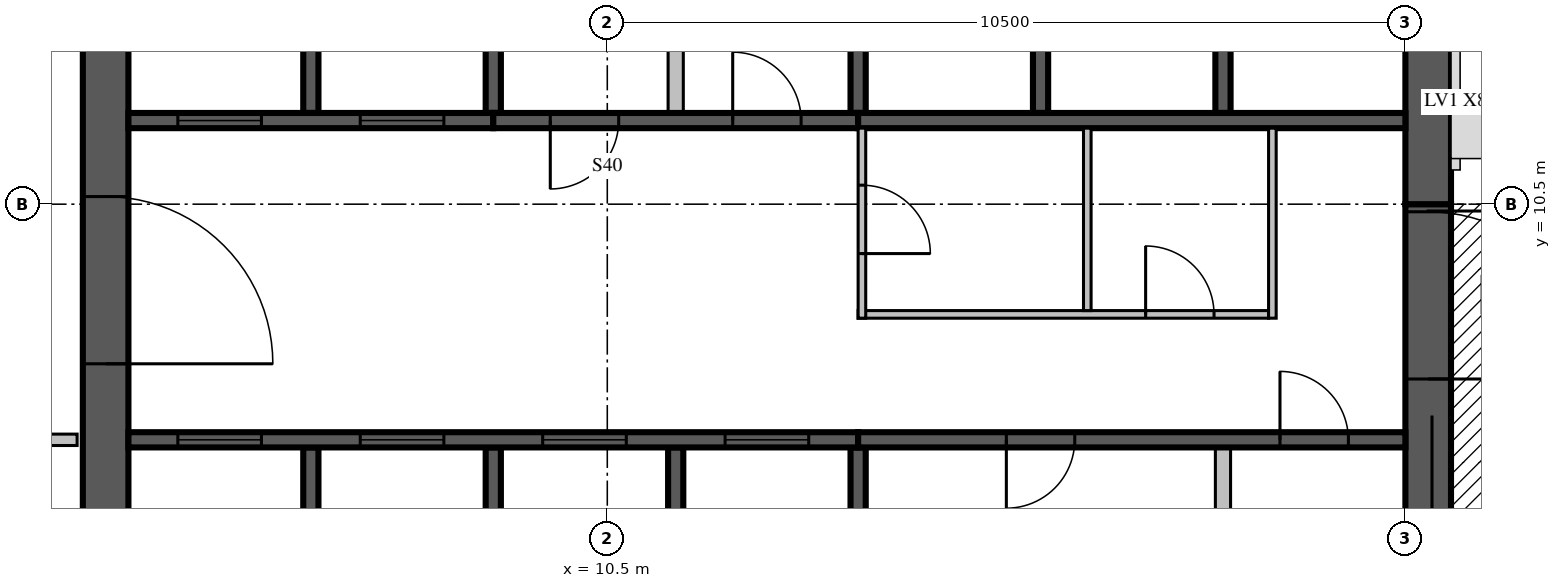
"""IFC4 building model, lengths in metres.
Left out: names, types, materials, properties, quantities, classifications, styles, units other than length and angle.
Written with IfcOpenShell. Run it as: python <this file> out.ifc"""

import sys

from ifc_helpers import new_model, si_unit, direction, frame, frame_2d, origin, place, context, subcontext, project, spatial, rectangle, extrude, source, transform, mapped, element, fill, save


model = new_model("IFC4")
c1 = context("Model", 3, precision=1e-05, world=origin(), true_north=direction((0.0, 1.0)))
c2 = subcontext(c1, "Body", "Model", "MODEL_VIEW")
j1 = project(units=[si_unit("LENGTHUNIT", "METRE"), si_unit("PLANEANGLEUNIT", "RADIAN")], contexts=[c1])
p1 = place(None, origin())
s1 = spatial("IfcSite", under=j1, at=p1, CompositionType="ELEMENT")
p2 = place(p1, origin())
s2 = spatial("IfcBuilding", under=s1, at=p2, CompositionType="ELEMENT")
p3 = place(p2, frame((0.0, 0.0, 291.5)))
s3 = spatial("IfcBuildingStorey", under=s2, at=p3, CompositionType="ELEMENT", Elevation=291.5)
m1 = source(origin(), c2, "Body", "SweptSolid", [
    extrude(rectangle(XDim=17.4, YDim=0.6, at=frame_2d((8.7, 0.0))), origin(), (0.0, 0.0, 1.0), 3.5),
])
p4 = place(p3, frame((3.9, 4.2, 0.0), z_axis=(0.0, 0.0, 1.0), x_axis=(0.0, 1.0, 0.0)))
e1 = element("IfcWall", 1, at=p4, inside=s3, PredefinedType="SHEAR", context=c2, shape_type="MappedRepresentation", body=[
    mapped(m1, transform((0.0, 0.0, 0.0), scale=1.0)),
])
m2 = source(origin(), c2, "Body", "SweptSolid", [
    extrude(rectangle(XDim=2.2, YDim=2.1, at=frame_2d((1.1, 1.05))), frame((0.0, 0.31, 0.0), z_axis=(0.0, -1.0, 0.0), x_axis=(1.0, 0.0, 0.0)), (0.0, 0.0, 1.0), 0.62),
])
p5 = place(p4, frame((4.2, 0.0, 0.0)))
e2 = element("IfcOpeningElement", 2, at=p5, cuts=e1, PredefinedType="OPENING", context=c2, shape_type="MappedRepresentation", body=[
    mapped(m2, transform((0.0, 0.0, 0.0), scale=1.0)),
])
m3 = source(origin(), c2, "Body", "SweptSolid", [
    extrude(rectangle(XDim=0.9, YDim=2.1, at=frame_2d((0.45, 1.05))), frame((0.0, 0.31, 0.0), z_axis=(0.0, -1.0, 0.0), x_axis=(1.0, 0.0, 0.0)), (0.0, 0.0, 1.0), 0.62),
])
p6 = place(p4, frame((10.95, 0.0, 0.0)))
e3 = element("IfcOpeningElement", 3, at=p6, cuts=e1, PredefinedType="OPENING", context=c2, shape_type="MappedRepresentation", body=[
    mapped(m3, transform((0.0, 0.0, 0.0), scale=1.0)),
])
m4 = source(origin(), c2, "Body", "SweptSolid", [
    extrude(rectangle(XDim=6.3, YDim=0.6, at=frame_2d((3.15, 0.0))), origin(), (0.0, 0.0, 1.0), 3.5),
])
p7 = place(p3, frame((21.3, 4.2, 0.0), z_axis=(0.0, 0.0, 1.0), x_axis=(0.0, 1.0, 0.0)))
e4 = element("IfcWall", 4, at=p7, inside=s3, PredefinedType="SHEAR", context=c2, shape_type="MappedRepresentation", body=[
    mapped(m4, transform((0.0, 0.0, 0.0), scale=1.0)),
])
p8 = place(p7, frame((4.0, 0.0, 0.0)))
e5 = element("IfcOpeningElement", 5, at=p8, cuts=e4, PredefinedType="OPENING", context=c2, shape_type="MappedRepresentation", body=[
    mapped(m2, transform((0.0, 0.0, 0.0), scale=1.0)),
])
m5 = source(origin(), c2, "Body", "SweptSolid", [
    extrude(rectangle(XDim=10.5, YDim=0.6, at=frame_2d((5.25, 0.0))), origin(), (0.0, 0.0, 1.0), 3.5),
])
p9 = place(p3, frame((21.3, 10.5, 0.0), z_axis=(0.0, 0.0, 1.0), x_axis=(0.0, 1.0, 0.0)))
e6 = element("IfcWall", 6, at=p9, inside=s3, PredefinedType="SHEAR", context=c2, shape_type="MappedRepresentation", body=[
    mapped(m5, transform((0.0, 0.0, 0.0), scale=1.0)),
])
m6 = source(origin(), c2, "Body", "SweptSolid", [
    extrude(rectangle(XDim=1.2, YDim=2.4, at=frame_2d((0.6, 1.2))), frame((0.0, 0.31, 0.0), z_axis=(0.0, -1.0, 0.0), x_axis=(1.0, 0.0, 0.0)), (0.0, 0.0, 1.0), 0.62),
])
p10 = place(p9, frame((5.7, 0.0, 0.6)))
e7 = element("IfcOpeningElement", 7, at=p10, cuts=e6, PredefinedType="OPENING", context=c2, shape_type="MappedRepresentation", body=[
    mapped(m6, transform((0.0, 0.0, 0.0), scale=1.0)),
])
m7 = source(origin(), c2, "Body", "SweptSolid", [
    extrude(rectangle(XDim=3.1, YDim=0.2, at=frame_2d((1.55, 0.0))), origin(), (0.0, 0.0, 1.0), 3.5),
])
for number, where, z_axis, x_axis in (
    (8, (6.6, 4.2, 0.0), (0.0, 0.0, 1.0), (0.0, 1.0, 0.0)),
    (9, (9.0, 4.2, 0.0), (0.0, 0.0, 1.0), (0.0, 1.0, 0.0)),
    (10, (11.4, 4.2, 0.0), (0.0, 0.0, 1.0), (0.0, 1.0, 0.0)),
):
    element("IfcWall", number, at=place(p3, frame(where, z_axis=z_axis, x_axis=x_axis)), inside=s3, PredefinedType="SOLIDWALL", context=c2, shape_type="MappedRepresentation", body=[
        mapped(m7, transform((0.0, 0.0, 0.0), scale=1.0)),
    ])
m8 = source(origin(), c2, "Body", "SweptSolid", [
    extrude(rectangle(XDim=3.1, YDim=0.2, at=frame_2d((1.55, 0.0))), origin(), (0.0, 0.0, 1.0), 3.1),
])
p11 = place(p3, frame((13.8, 4.2, 0.0), z_axis=(0.0, 0.0, 1.0), x_axis=(0.0, 1.0, 0.0)))
e11 = element("IfcWall", 11, at=p11, inside=s3, PredefinedType="SOLIDWALL", context=c2, shape_type="MappedRepresentation", body=[
    mapped(m8, transform((0.0, 0.0, 0.0), scale=1.0)),
])
m9 = source(origin(), c2, "Body", "SweptSolid", [
    extrude(rectangle(XDim=3.1, YDim=0.2, at=frame_2d((1.55, 0.0))), origin(), (0.0, 0.0, 1.0), 3.1),
])
p12 = place(p3, frame((18.6, 4.2, 0.0), z_axis=(0.0, 0.0, 1.0), x_axis=(0.0, 1.0, 0.0)))
e12 = element("IfcWall", 12, at=p12, inside=s3, PredefinedType="PARTITIONING", context=c2, shape_type="MappedRepresentation", body=[
    mapped(m9, transform((0.0, 0.0, 0.0), scale=1.0)),
])
m10 = source(origin(), c2, "Body", "SweptSolid", [
    extrude(rectangle(XDim=3.0, YDim=0.2, at=frame_2d((1.5, 0.0))), origin(), (0.0, 0.0, 1.0), 3.5),
])
p13 = place(p3, frame((6.6, 11.7, 0.0), z_axis=(0.0, 0.0, 1.0), x_axis=(0.0, 1.0, 0.0)))
e13 = element("IfcWall", 13, at=p13, inside=s3, PredefinedType="SOLIDWALL", context=c2, shape_type="MappedRepresentation", body=[
    mapped(m10, transform((0.0, 0.0, 0.0), scale=1.0)),
])
m11 = source(origin(), c2, "Body", "SweptSolid", [
    extrude(rectangle(XDim=3.0, YDim=0.2, at=frame_2d((1.5, 0.0))), origin(), (0.0, 0.0, 1.0), 3.1),
])
for number, where, z_axis, x_axis in (
    (14, (9.0, 11.7, 0.0), (0.0, 0.0, 1.0), (0.0, 1.0, 0.0)),
    (15, (13.8, 11.7, 0.0), (0.0, 0.0, 1.0), (0.0, 1.0, 0.0)),
):
    element("IfcWall", number, at=place(p3, frame(where, z_axis=z_axis, x_axis=x_axis)), inside=s3, PredefinedType="SOLIDWALL", context=c2, shape_type="MappedRepresentation", body=[
        mapped(m11, transform((0.0, 0.0, 0.0), scale=1.0)),
    ])
for number, where, z_axis, x_axis in (
    (16, (16.2, 11.7, 0.0), (0.0, 0.0, 1.0), (0.0, 1.0, 0.0)),
    (17, (18.6, 11.7, 0.0), (0.0, 0.0, 1.0), (0.0, 1.0, 0.0)),
):
    element("IfcWall", number, at=place(p3, frame(where, z_axis=z_axis, x_axis=x_axis)), inside=s3, PredefinedType="SOLIDWALL", context=c2, shape_type="MappedRepresentation", body=[
        mapped(m10, transform((0.0, 0.0, 0.0), scale=1.0)),
    ])
m12 = source(origin(), c2, "Body", "SweptSolid", [
    extrude(rectangle(XDim=3.0, YDim=0.2, at=frame_2d((1.5, 0.0))), origin(), (0.0, 0.0, 1.0), 3.1),
])
p14 = place(p3, frame((11.4, 11.7, 0.0), z_axis=(0.0, 0.0, 1.0), x_axis=(0.0, 1.0, 0.0)))
e18 = element("IfcWall", 18, at=p14, inside=s3, PredefinedType="PARTITIONING", context=c2, shape_type="MappedRepresentation", body=[
    mapped(m12, transform((0.0, 0.0, 0.0), scale=1.0)),
])
m13 = source(origin(), c2, "Body", "SweptSolid", [
    extrude(rectangle(XDim=9.6, YDim=0.2, at=frame_2d((4.8, 0.0))), origin(), (0.0, 0.0, 1.0), 3.5),
])
p15 = place(p3, frame((4.2, 7.4, 0.0), z_axis=(0.0, 0.0, 1.0), x_axis=(1.0, 0.0, 0.0)))
e19 = element("IfcWall", 19, at=p15, inside=s3, PredefinedType="SOLIDWALL", context=c2, shape_type="MappedRepresentation", body=[
    mapped(m13, transform((0.0, 0.0, 0.0), scale=1.0)),
])
m14 = source(origin(), c2, "Body", "SweptSolid", [
    extrude(rectangle(XDim=1.1, YDim=2.1, at=frame_2d((0.55, 1.05))), frame((0.0, 0.11, 0.0), z_axis=(0.0, -1.0, 0.0), x_axis=(1.0, 0.0, 0.0)), (0.0, 0.0, 1.0), 0.22),
])
p16 = place(p15, frame((0.65, 0.0, 0.0)))
e20 = element("IfcOpeningElement", 20, at=p16, cuts=e19, PredefinedType="OPENING", context=c2, shape_type="MappedRepresentation", body=[
    mapped(m14, transform((0.0, 0.0, 0.0), scale=1.0)),
])
p17 = place(p15, frame((3.05, 0.0, 0.0)))
e21 = element("IfcOpeningElement", 21, at=p17, cuts=e19, PredefinedType="OPENING", context=c2, shape_type="MappedRepresentation", body=[
    mapped(m14, transform((0.0, 0.0, 0.0), scale=1.0)),
])
p18 = place(p15, frame((5.45, 0.0, 0.0)))
e22 = element("IfcOpeningElement", 22, at=p18, cuts=e19, PredefinedType="OPENING", context=c2, shape_type="MappedRepresentation", body=[
    mapped(m14, transform((0.0, 0.0, 0.0), scale=1.0)),
])
p19 = place(p15, frame((7.85, 0.0, 0.0)))
e23 = element("IfcOpeningElement", 23, at=p19, cuts=e19, PredefinedType="OPENING", context=c2, shape_type="MappedRepresentation", body=[
    mapped(m14, transform((0.0, 0.0, 0.0), scale=1.0)),
])
m15 = source(origin(), c2, "Body", "SweptSolid", [
    extrude(rectangle(XDim=7.2, YDim=0.2, at=frame_2d((3.6, 0.0))), origin(), (0.0, 0.0, 1.0), 3.1),
])
p20 = place(p3, frame((13.8, 7.4, 0.0), z_axis=(0.0, 0.0, 1.0), x_axis=(1.0, 0.0, 0.0)))
e24 = element("IfcWall", 24, at=p20, inside=s3, PredefinedType="SOLIDWALL", context=c2, shape_type="MappedRepresentation", body=[
    mapped(m15, transform((0.0, 0.0, 0.0), scale=1.0)),
])
m16 = source(origin(), c2, "Body", "SweptSolid", [
    extrude(rectangle(XDim=0.9, YDim=2.1, at=frame_2d((0.45, 1.05))), frame((0.0, 0.11, 0.0), z_axis=(0.0, -1.0, 0.0), x_axis=(1.0, 0.0, 0.0)), (0.0, 0.0, 1.0), 0.22),
])
p21 = place(p20, frame((1.95, 0.0, 0.0)))
e25 = element("IfcOpeningElement", 25, at=p21, cuts=e24, PredefinedType="OPENING", context=c2, shape_type="MappedRepresentation", body=[
    mapped(m16, transform((0.0, 0.0, 0.0), scale=1.0)),
])
p22 = place(p20, frame((5.55, 0.0, 0.0)))
e26 = element("IfcOpeningElement", 26, at=p22, cuts=e24, PredefinedType="OPENING", context=c2, shape_type="MappedRepresentation", body=[
    mapped(m16, transform((0.0, 0.0, 0.0), scale=1.0)),
])
m17 = source(origin(), c2, "Body", "SweptSolid", [
    extrude(rectangle(XDim=4.8, YDim=0.2, at=frame_2d((2.4, 0.0))), origin(), (0.0, 0.0, 1.0), 3.5),
])
p23 = place(p3, frame((4.2, 11.6, 0.0), z_axis=(0.0, 0.0, 1.0), x_axis=(1.0, 0.0, 0.0)))
e27 = element("IfcWall", 27, at=p23, inside=s3, PredefinedType="SOLIDWALL", context=c2, shape_type="MappedRepresentation", body=[
    mapped(m17, transform((0.0, 0.0, 0.0), scale=1.0)),
])
p24 = place(p23, frame((0.65, 0.0, 0.0)))
e28 = element("IfcOpeningElement", 28, at=p24, cuts=e27, PredefinedType="OPENING", context=c2, shape_type="MappedRepresentation", body=[
    mapped(m14, transform((0.0, 0.0, 0.0), scale=1.0)),
])
p25 = place(p23, frame((3.05, 0.0, 0.0)))
e29 = element("IfcOpeningElement", 29, at=p25, cuts=e27, PredefinedType="OPENING", context=c2, shape_type="MappedRepresentation", body=[
    mapped(m14, transform((0.0, 0.0, 0.0), scale=1.0)),
])
m18 = source(origin(), c2, "Body", "SweptSolid", [
    extrude(rectangle(XDim=4.8, YDim=0.2, at=frame_2d((2.4, 0.0))), origin(), (0.0, 0.0, 1.0), 3.1),
])
p26 = place(p3, frame((9.0, 11.6, 0.0), z_axis=(0.0, 0.0, 1.0), x_axis=(1.0, 0.0, 0.0)))
e30 = element("IfcWall", 30, at=p26, inside=s3, PredefinedType="SOLIDWALL", context=c2, shape_type="MappedRepresentation", body=[
    mapped(m18, transform((0.0, 0.0, 0.0), scale=1.0)),
])
p27 = place(p26, frame((0.75, 0.0, 0.0)))
e31 = element("IfcOpeningElement", 31, at=p27, cuts=e30, PredefinedType="OPENING", context=c2, shape_type="MappedRepresentation", body=[
    mapped(m16, transform((0.0, 0.0, 0.0), scale=1.0)),
])
p28 = place(p26, frame((3.15, 0.0, 0.0)))
e32 = element("IfcOpeningElement", 32, at=p28, cuts=e30, PredefinedType="OPENING", context=c2, shape_type="MappedRepresentation", body=[
    mapped(m16, transform((0.0, 0.0, 0.0), scale=1.0)),
])
m19 = source(origin(), c2, "Body", "SweptSolid", [
    extrude(rectangle(XDim=7.2, YDim=0.2, at=frame_2d((3.6, 0.0))), origin(), (0.0, 0.0, 1.0), 3.5),
])
p29 = place(p3, frame((13.8, 11.6, 0.0), z_axis=(0.0, 0.0, 1.0), x_axis=(1.0, 0.0, 0.0)))
e33 = element("IfcWall", 33, at=p29, inside=s3, PredefinedType="SOLIDWALL", context=c2, shape_type="MappedRepresentation", body=[
    mapped(m19, transform((0.0, 0.0, 0.0), scale=1.0)),
])
p30 = place(p3, frame((13.8, 9.05, 0.0), z_axis=(0.0, 0.0, 1.0), x_axis=(1.0, 0.0, 0.0)))
e34 = element("IfcWall", 34, at=p30, inside=s3, PredefinedType="PARTITIONING", context=c2, shape_type="SweptSolid", body=[
    extrude(rectangle(XDim=5.4, YDim=0.1, at=frame_2d((2.7, 0.0))), origin(), (0.0, 0.0, 1.0), 3.1),
])
m20 = source(origin(), c2, "Body", "SweptSolid", [
    extrude(rectangle(XDim=0.9, YDim=2.1, at=frame_2d((0.45, 1.05))), frame((0.0, 0.06, 0.0), z_axis=(0.0, -1.0, 0.0), x_axis=(1.0, 0.0, 0.0)), (0.0, 0.0, 1.0), 0.12),
])
p31 = place(p30, frame((3.783, 0.0, 0.0)))
e35 = element("IfcOpeningElement", 35, at=p31, cuts=e34, PredefinedType="OPENING", context=c2, shape_type="MappedRepresentation", body=[
    mapped(m20, transform((0.0, 0.0, 0.0), scale=1.0)),
])
p32 = place(p3, frame((13.85, 9.0, 0.0), z_axis=(0.0, 0.0, 1.0), x_axis=(0.0, 1.0, 0.0)))
e36 = element("IfcWall", 36, at=p32, inside=s3, PredefinedType="PARTITIONING", context=c2, shape_type="SweptSolid", body=[
    extrude(rectangle(XDim=2.5, YDim=0.1, at=frame_2d((1.25, 0.0))), origin(), (0.0, 0.0, 1.0), 3.1),
])
p33 = place(p32, frame((0.85, 0.0, 0.0)))
e37 = element("IfcOpeningElement", 37, at=p33, cuts=e36, PredefinedType="OPENING", context=c2, shape_type="MappedRepresentation", body=[
    mapped(m20, transform((0.0, 0.0, 0.0), scale=1.0)),
])
p34 = place(p3, frame((16.815, 9.1, 0.0), z_axis=(0.0, 0.0, 1.0), x_axis=(0.0, 1.0, 0.0)))
e38 = element("IfcWall", 38, at=p34, inside=s3, PredefinedType="PARTITIONING", context=c2, shape_type="SweptSolid", body=[
    extrude(rectangle(XDim=2.4, YDim=0.1, at=frame_2d((1.2, 0.0))), origin(), (0.0, 0.0, 1.0), 3.1),
])
m21 = source(origin(), c2, "Body", "SweptSolid", [
    extrude(rectangle(XDim=2.5, YDim=0.1, at=frame_2d((1.25, 0.0))), origin(), (0.0, 0.0, 1.0), 3.1),
])
p35 = place(p3, frame((19.25, 9.0, 0.0), z_axis=(0.0, 0.0, 1.0), x_axis=(0.0, 1.0, 0.0)))
e39 = element("IfcWall", 39, at=p35, inside=s3, PredefinedType="PARTITIONING", context=c2, shape_type="MappedRepresentation", body=[
    mapped(m21, transform((0.0, 0.0, 0.0), scale=1.0)),
])
m22 = source(origin(), c2, "Body", "SweptSolid", [
    extrude(rectangle(XDim=3.225, YDim=0.15, at=frame_2d((1.613, 0.0))), origin(), (0.0, 0.0, 1.0), 3.1),
])
p36 = place(p3, frame((0.3, 7.4, 0.0), z_axis=(0.0, 0.0, 1.0), x_axis=(1.0, 0.0, 0.0)))
e40 = element("IfcWall", 40, at=p36, inside=s3, PredefinedType="PARTITIONING", context=c2, shape_type="MappedRepresentation", body=[
    mapped(m22, transform((0.0, 0.0, 0.0), scale=1.0)),
])
m23 = source(origin(), c2, "Body", "SweptSolid", [
    extrude(rectangle(XDim=0.9, YDim=2.1, at=frame_2d((0.45, 1.05))), frame((0.0, 0.085, 0.0), z_axis=(0.0, -1.0, 0.0), x_axis=(1.0, 0.0, 0.0)), (0.0, 0.0, 1.0), 0.17),
])
p37 = place(p36, frame((1.2, 0.0, 0.0)))
e41 = element("IfcOpeningElement", 41, at=p37, cuts=e40, PredefinedType="OPENING", context=c2, shape_type="MappedRepresentation", body=[
    mapped(m23, transform((0.0, 0.0, 0.0), scale=1.0)),
])
m24 = source(origin(), c2, "Body", "SweptSolid", [
    extrude(rectangle(XDim=1.1, YDim=2.1, at=frame_2d((0.55, 1.05))), frame((0.0, 0.025, 0.0), z_axis=(0.0, -1.0, 0.0), x_axis=(1.0, 0.0, 0.0)), (0.0, 0.0, 1.0), 0.05),
])
p38 = place(p16, origin())
e42 = element("IfcDoor", 42, at=p38, inside=s3, OperationType="SLIDING_TO_LEFT", PredefinedType="DOOR", context=c2, shape_type="MappedRepresentation", body=[
    mapped(m24, transform((0.0, 0.0, 0.0), scale=1.0)),
])
fill(e20, e42)
p39 = place(p17, origin())
e43 = element("IfcDoor", 43, at=p39, inside=s3, OperationType="SLIDING_TO_LEFT", PredefinedType="DOOR", context=c2, shape_type="MappedRepresentation", body=[
    mapped(m24, transform((0.0, 0.0, 0.0), scale=1.0)),
])
fill(e21, e43)
p40 = place(p18, origin())
e44 = element("IfcDoor", 44, at=p40, inside=s3, OperationType="SLIDING_TO_LEFT", PredefinedType="DOOR", context=c2, shape_type="MappedRepresentation", body=[
    mapped(m24, transform((0.0, 0.0, 0.0), scale=1.0)),
])
fill(e22, e44)
p41 = place(p19, origin())
e45 = element("IfcDoor", 45, at=p41, inside=s3, OperationType="SLIDING_TO_LEFT", PredefinedType="DOOR", context=c2, shape_type="MappedRepresentation", body=[
    mapped(m24, transform((0.0, 0.0, 0.0), scale=1.0)),
])
fill(e23, e45)
m25 = source(origin(), c2, "Body", "SweptSolid", [
    extrude(rectangle(XDim=0.9, YDim=2.1, at=frame_2d((0.45, 1.05))), frame((0.0, 0.025, 0.0), z_axis=(0.0, -1.0, 0.0), x_axis=(1.0, 0.0, 0.0)), (0.0, 0.0, 1.0), 0.05),
])
p42 = place(p21, origin())
e46 = element("IfcDoor", 46, at=p42, inside=s3, OperationType="SINGLE_SWING_RIGHT", PredefinedType="DOOR", context=c2, shape_type="MappedRepresentation", body=[
    mapped(m25, transform((0.0, 0.0, 0.0), scale=1.0)),
])
fill(e25, e46)
p43 = place(p22, origin())
e47 = element("IfcDoor", 47, at=p43, inside=s3, OperationType="SINGLE_SWING_LEFT", PredefinedType="DOOR", context=c2, shape_type="MappedRepresentation", body=[
    mapped(m25, transform((0.0, 0.0, 0.0), scale=1.0)),
])
fill(e26, e47)
p44 = place(p24, origin())
e48 = element("IfcDoor", 48, at=p44, inside=s3, OperationType="SLIDING_TO_LEFT", PredefinedType="DOOR", context=c2, shape_type="MappedRepresentation", body=[
    mapped(m24, transform((0.0, 0.0, 0.0), scale=1.0)),
])
fill(e28, e48)
p45 = place(p25, origin())
e49 = element("IfcDoor", 49, at=p45, inside=s3, OperationType="SLIDING_TO_LEFT", PredefinedType="DOOR", context=c2, shape_type="MappedRepresentation", body=[
    mapped(m24, transform((0.0, 0.0, 0.0), scale=1.0)),
])
fill(e29, e49)
p46 = place(p27, origin())
e50 = element("IfcDoor", 50, at=p46, inside=s3, OperationType="SINGLE_SWING_RIGHT", PredefinedType="DOOR", context=c2, shape_type="MappedRepresentation", body=[
    mapped(m25, transform((0.0, 0.0, 0.0), scale=1.0)),
])
fill(e31, e50)
p47 = place(p28, origin())
e51 = element("IfcDoor", 51, at=p47, inside=s3, OperationType="SINGLE_SWING_LEFT", PredefinedType="DOOR", context=c2, shape_type="MappedRepresentation", body=[
    mapped(m25, transform((0.0, 0.0, 0.0), scale=1.0)),
])
fill(e32, e51)
p48 = place(p31, origin())
e52 = element("IfcDoor", 52, at=p48, inside=s3, OperationType="SINGLE_SWING_LEFT", PredefinedType="DOOR", context=c2, shape_type="MappedRepresentation", body=[
    mapped(m25, transform((0.0, 0.0, 0.0), scale=1.0)),
])
fill(e35, e52)
p49 = place(p33, origin())
e53 = element("IfcDoor", 53, at=p49, inside=s3, OperationType="SINGLE_SWING_RIGHT", PredefinedType="DOOR", context=c2, shape_type="MappedRepresentation", body=[
    mapped(m25, transform((0.0, 0.0, 0.0), scale=1.0)),
])
fill(e37, e53)
m26 = source(origin(), c2, "Body", "SweptSolid", [
    extrude(rectangle(XDim=2.2, YDim=2.1, at=frame_2d((1.1, 1.05))), frame((0.0, 0.025, 0.0), z_axis=(0.0, -1.0, 0.0), x_axis=(1.0, 0.0, 0.0)), (0.0, 0.0, 1.0), 0.05),
])
p50 = place(p8, origin())
e54 = element("IfcDoor", 54, at=p50, inside=s3, OperationType="DOUBLE_DOOR_SINGLE_SWING", PredefinedType="DOOR", context=c2, shape_type="MappedRepresentation", body=[
    mapped(m26, transform((0.0, 0.0, 0.0), scale=1.0)),
])
fill(e5, e54)
p51 = place(p5, origin())
e55 = element("IfcDoor", 55, at=p51, inside=s3, OperationType="DOUBLE_DOOR_SINGLE_SWING", PredefinedType="DOOR", context=c2, shape_type="MappedRepresentation", body=[
    mapped(m26, transform((0.0, 0.0, 0.0), scale=1.0)),
])
fill(e2, e55)
save(model, sys.argv[1])
